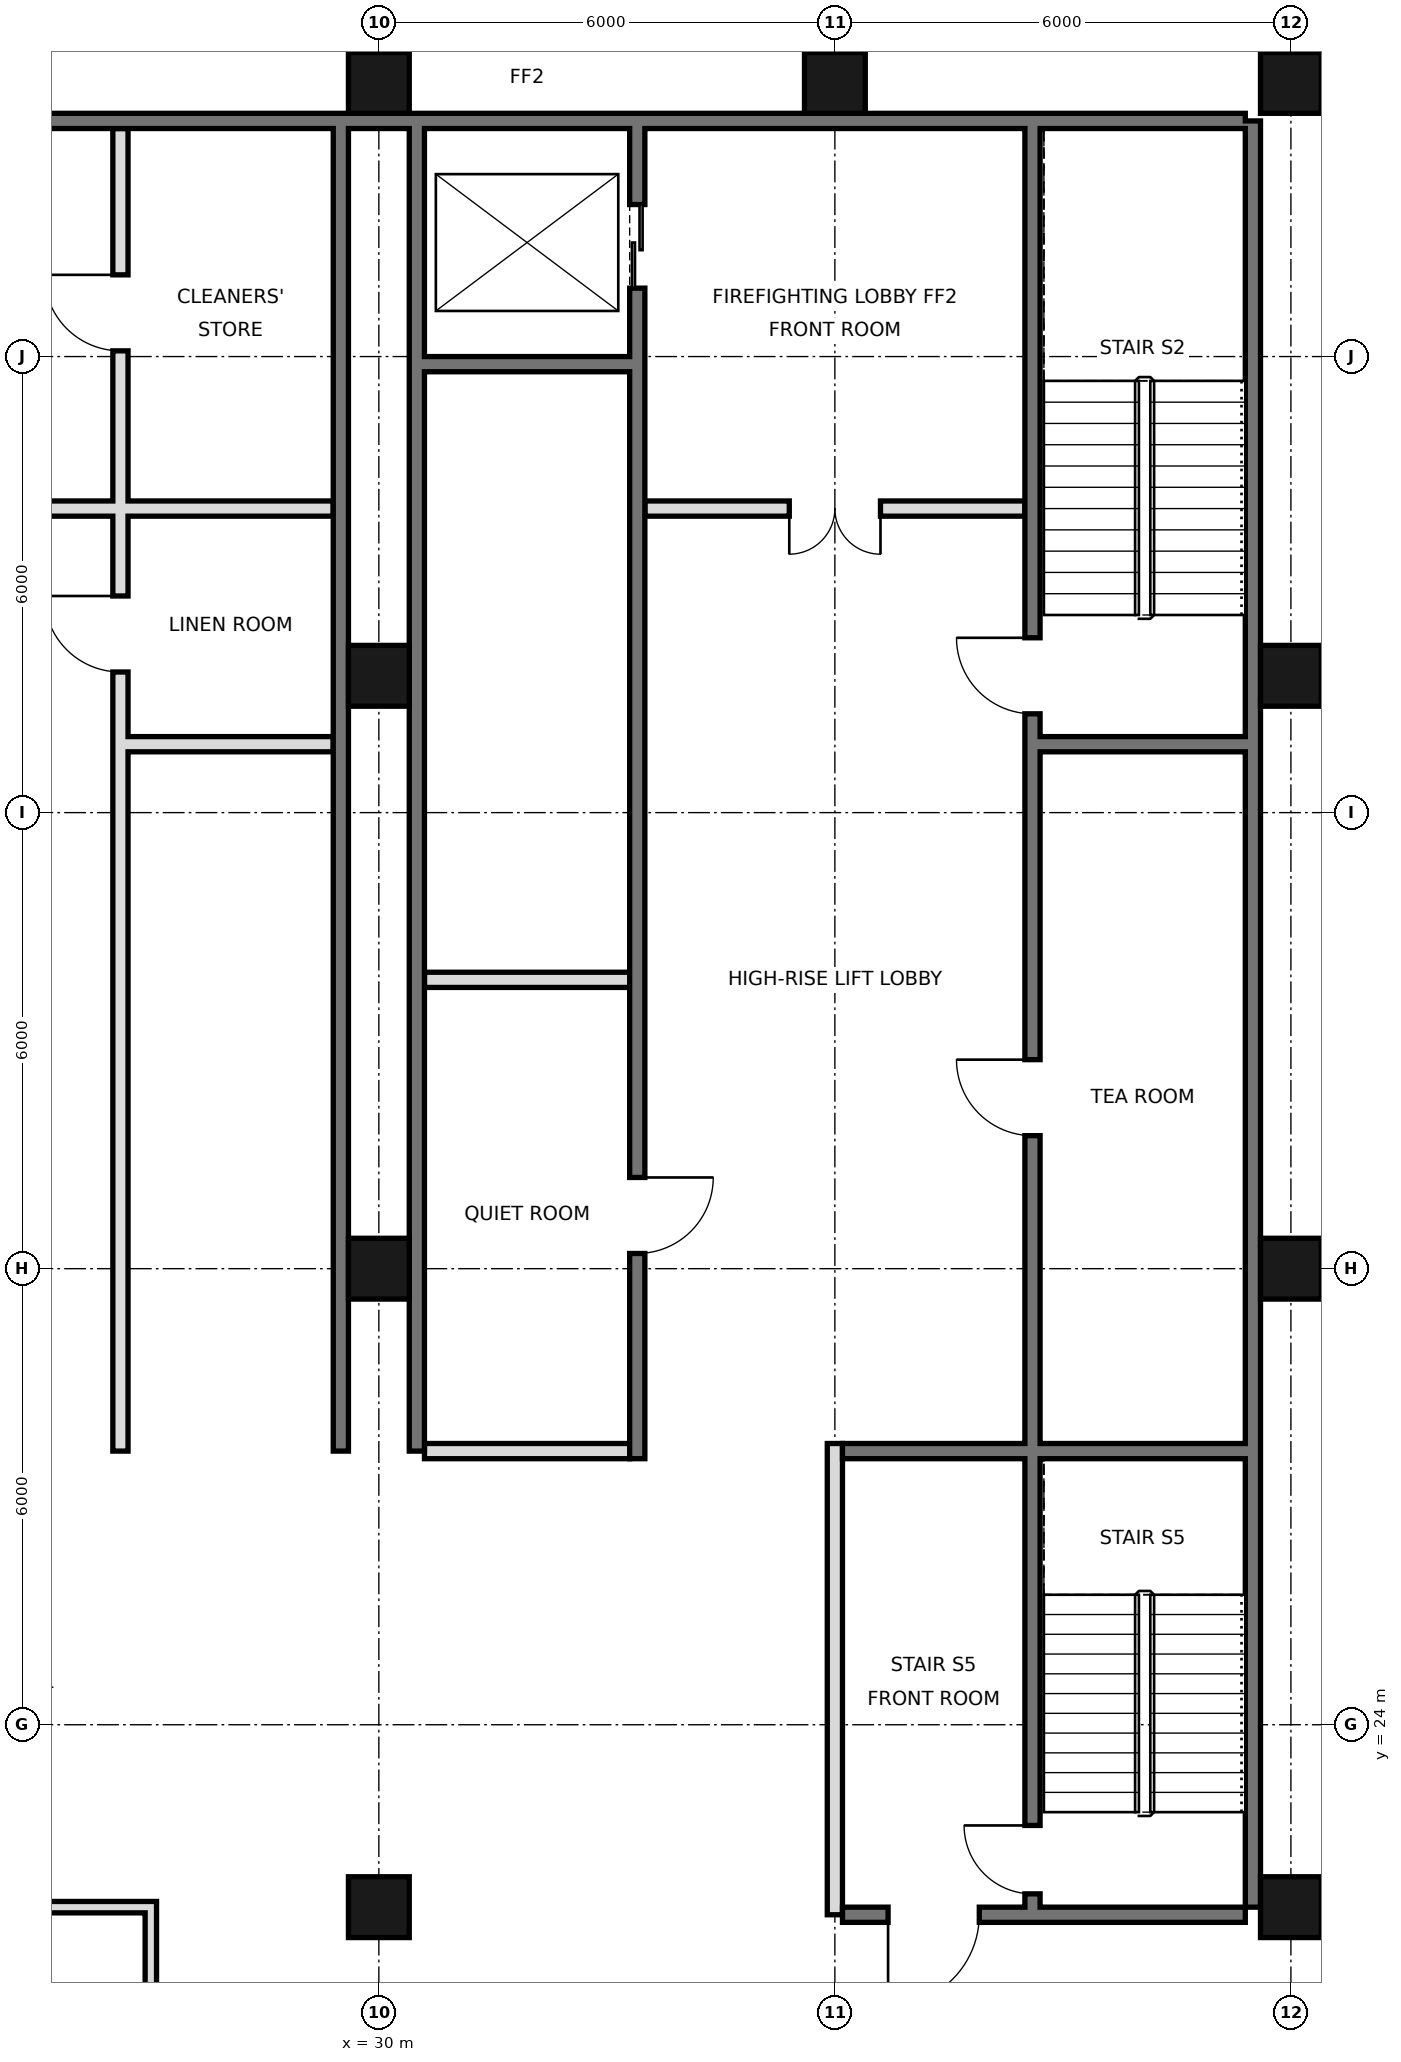
"""IFC4 building model, lengths in metres.
Left out: names, types, materials, properties, quantities, classifications, styles, units other than length and angle.
Written with IfcOpenShell. Run it as: python <this file> out.ifc"""

import sys

from ifc_helpers import new_model, si_unit, direction, frame, frame_2d, origin, origin_2d, place, context, subcontext, project, spatial, rectangle, hollow_rectangle, extrude, element, fill, save


model = new_model("IFC4")
c1 = context("Model", 3, precision=1e-05, world=origin(), true_north=direction((0.0, 1.0)))
c2 = subcontext(c1, "Body", "Model", "MODEL_VIEW")
j1 = project(units=[si_unit("LENGTHUNIT", "METRE"), si_unit("PLANEANGLEUNIT", "RADIAN")], contexts=[c1])
p1 = place(None, origin())
s1 = spatial("IfcSite", under=j1, at=p1, CompositionType="ELEMENT")
p2 = place(p1, origin())
s2 = spatial("IfcBuilding", under=s1, at=p2, CompositionType="ELEMENT")
p3 = place(p2, frame((0.0, 0.0, 341.8)))
s3 = spatial("IfcBuildingStorey", under=s2, at=p3, CompositionType="ELEMENT", Elevation=341.8)
for number, where, z_axis, x_axis in (
    (1, (30.0, 21.6, 0.0), (0.0, 0.0, 1.0), (1.0, 0.0, 0.0)),
    (2, (30.0, 30.0, 0.0), (0.0, 0.0, 1.0), (1.0, 0.0, 0.0)),
    (3, (30.0, 37.8, 0.0), (0.0, 0.0, 1.0), (1.0, 0.0, 0.0)),
    (4, (30.0, 45.6, 0.0), (0.0, 0.0, 1.0), (1.0, 0.0, 0.0)),
    (5, (36.0, 45.6, 0.0), (0.0, 0.0, 1.0), (1.0, 0.0, 0.0)),
    (6, (42.0, 21.6, 0.0), (0.0, 0.0, 1.0), (1.0, 0.0, 0.0)),
    (7, (42.0, 30.0, 0.0), (0.0, 0.0, 1.0), (1.0, 0.0, 0.0)),
    (8, (42.0, 37.8, 0.0), (0.0, 0.0, 1.0), (1.0, 0.0, 0.0)),
    (9, (42.0, 45.6, 0.0), (0.0, 0.0, 1.0), (1.0, 0.0, 0.0)),
):
    element("IfcColumn", number, at=place(p3, frame(where, z_axis=z_axis, x_axis=x_axis)), inside=s3, PredefinedType="COLUMN", context=c2, shape_type="SweptSolid", body=[
        extrude(hollow_rectangle(XDim=0.8, YDim=0.8, WallThickness=0.025, at=origin_2d()), origin(), (0.0, 0.0, 1.0), 4.0),
    ])
p4 = place(p3, frame((27.0, 17.525, 0.0), z_axis=(0.0, 0.0, 1.0), x_axis=(0.0, 1.0, 0.0)))
e10 = element("IfcWall", 10, at=p4, inside=s3, PredefinedType="PARTITIONING", context=c2, shape_type="SweptSolid", body=[
    extrude(rectangle(XDim=4.15, YDim=0.15, at=frame_2d((2.075, 0.0))), origin(), (0.0, 0.0, 1.0), 3.75),
])
p5 = place(p3, frame((23.075, 21.6, 0.0), z_axis=(0.0, 0.0, 1.0), x_axis=(1.0, 0.0, 0.0)))
e11 = element("IfcWall", 11, at=p5, inside=s3, PredefinedType="PARTITIONING", context=c2, shape_type="SweptSolid", body=[
    extrude(rectangle(XDim=3.85, YDim=0.15, at=frame_2d((1.925, 0.0))), origin(), (0.0, 0.0, 1.0), 3.75),
])
p6 = place(p5, frame((1.425, 0.0, 0.0)))
e12 = element("IfcOpeningElement", 12, at=p6, cuts=e11, PredefinedType="OPENING", context=c2, shape_type="SweptSolid", body=[
    extrude(rectangle(XDim=1.0, YDim=2.4, at=frame_2d((0.5, 1.2))), frame((0.0, 0.085, 0.0), z_axis=(0.0, -1.0, 0.0), x_axis=(1.0, 0.0, 0.0)), (0.0, 0.0, 1.0), 0.17),
])
p7 = place(p3, frame((41.5, 21.6, 0.0), z_axis=(0.0, 0.0, 1.0), x_axis=(0.0, 1.0, 0.0)))
e13 = element("IfcWall", 13, at=p7, inside=s3, PredefinedType="SOLIDWALL", context=c2, shape_type="SweptSolid", body=[
    extrude(rectangle(XDim=23.5, YDim=0.2, at=frame_2d((11.75, 0.0))), origin(), (0.0, 0.0, 1.0), 3.75),
])
p8 = place(p3, frame((6.6, 45.1, 0.0), z_axis=(0.0, 0.0, 1.0), x_axis=(1.0, 0.0, 0.0)))
e14 = element("IfcWall", 14, at=p8, inside=s3, PredefinedType="SOLIDWALL", context=c2, shape_type="SweptSolid", body=[
    extrude(rectangle(XDim=34.8, YDim=0.2, at=frame_2d((17.4, 0.0))), origin(), (0.0, 0.0, 1.0), 3.75),
])
for number, where, z_axis, x_axis in (
    (15, (29.5, 27.6, 0.0), (0.0, 0.0, 1.0), (0.0, 1.0, 0.0)),
    (16, (30.5, 27.6, 0.0), (0.0, 0.0, 1.0), (0.0, 1.0, 0.0)),
):
    element("IfcWall", number, at=place(p3, frame(where, z_axis=z_axis, x_axis=x_axis)), inside=s3, PredefinedType="SOLIDWALL", context=c2, shape_type="SweptSolid", body=[
        extrude(rectangle(XDim=17.5, YDim=0.2, at=frame_2d((8.75, 0.0))), origin(), (0.0, 0.0, 1.0), 3.75),
    ])
p9 = place(p3, frame((26.6, 27.6, 0.0), z_axis=(0.0, 0.0, 1.0), x_axis=(0.0, 1.0, 0.0)))
e17 = element("IfcWall", 17, at=p9, inside=s3, PredefinedType="PARTITIONING", context=c2, shape_type="SweptSolid", body=[
    extrude(rectangle(XDim=17.4, YDim=0.2, at=frame_2d((8.7, 0.0))), origin(), (0.0, 0.0, 1.0), 3.75),
])
p10 = place(p9, frame((10.25, 0.0, 0.0)))
e18 = element("IfcOpeningElement", 18, at=p10, cuts=e17, PredefinedType="OPENING", context=c2, shape_type="SweptSolid", body=[
    extrude(rectangle(XDim=1.0, YDim=2.1, at=frame_2d((0.5, 1.05))), frame((0.0, 0.11, 0.0), z_axis=(0.0, -1.0, 0.0), x_axis=(1.0, 0.0, 0.0)), (0.0, 0.0, 1.0), 0.22),
])
p11 = place(p9, frame((14.475, 0.0, 0.0)))
e19 = element("IfcOpeningElement", 19, at=p11, cuts=e17, PredefinedType="OPENING", context=c2, shape_type="SweptSolid", body=[
    extrude(rectangle(XDim=1.0, YDim=2.1, at=frame_2d((0.5, 1.05))), frame((0.0, 0.11, 0.0), z_axis=(0.0, -1.0, 0.0), x_axis=(1.0, 0.0, 0.0)), (0.0, 0.0, 1.0), 0.22),
])
p12 = place(p3, frame((33.4, 27.5, 0.0), z_axis=(0.0, 0.0, 1.0), x_axis=(0.0, 1.0, 0.0)))
e20 = element("IfcWall", 20, at=p12, inside=s3, PredefinedType="SOLIDWALL", context=c2, shape_type="SweptSolid", body=[
    extrude(rectangle(XDim=17.5, YDim=0.2, at=frame_2d((8.75, 0.0))), origin(), (0.0, 0.0, 1.0), 3.75),
])
p13 = place(p12, frame((15.4, 0.0, 0.0)))
e21 = element("IfcOpeningElement", 21, at=p13, cuts=e20, PredefinedType="OPENING", context=c2, shape_type="SweptSolid", body=[
    extrude(rectangle(XDim=1.1, YDim=2.1, at=frame_2d((0.55, 1.05))), frame((0.0, 0.11, 0.0), z_axis=(0.0, -1.0, 0.0), x_axis=(1.0, 0.0, 0.0)), (0.0, 0.0, 1.0), 0.22),
])
p14 = place(p12, frame((2.7, 0.0, 0.0)))
e22 = element("IfcOpeningElement", 22, at=p14, cuts=e20, PredefinedType="OPENING", context=c2, shape_type="SweptSolid", body=[
    extrude(rectangle(XDim=1.0, YDim=2.1, at=frame_2d((0.5, 1.05))), frame((0.0, 0.11, 0.0), z_axis=(0.0, -1.0, 0.0), x_axis=(1.0, 0.0, 0.0)), (0.0, 0.0, 1.0), 0.22),
])
p15 = place(p3, frame((36.0, 21.5, 0.0), z_axis=(0.0, 0.0, 1.0), x_axis=(0.0, 1.0, 0.0)))
e23 = element("IfcWall", 23, at=p15, inside=s3, PredefinedType="PARTITIONING", context=c2, shape_type="SweptSolid", body=[
    extrude(rectangle(XDim=6.2, YDim=0.2, at=frame_2d((3.1, 0.0))), origin(), (0.0, 0.0, 1.0), 3.75),
])
p16 = place(p3, frame((38.6, 21.5, 0.0), z_axis=(0.0, 0.0, 1.0), x_axis=(0.0, 1.0, 0.0)))
e24 = element("IfcWall", 24, at=p16, inside=s3, PredefinedType="SOLIDWALL", context=c2, shape_type="SweptSolid", body=[
    extrude(rectangle(XDim=23.5, YDim=0.2, at=frame_2d((11.75, 0.0))), origin(), (0.0, 0.0, 1.0), 3.75),
])
p17 = place(p16, frame((10.25, 0.0, 0.0)))
e25 = element("IfcOpeningElement", 25, at=p17, cuts=e24, PredefinedType="OPENING", context=c2, shape_type="SweptSolid", body=[
    extrude(rectangle(XDim=1.0, YDim=2.1, at=frame_2d((0.5, 1.05))), frame((0.0, 0.11, 0.0), z_axis=(0.0, -1.0, 0.0), x_axis=(1.0, 0.0, 0.0)), (0.0, 0.0, 1.0), 0.22),
])
p18 = place(p16, frame((15.8, 0.0, 0.0)))
e26 = element("IfcOpeningElement", 26, at=p18, cuts=e24, PredefinedType="OPENING", context=c2, shape_type="SweptSolid", body=[
    extrude(rectangle(XDim=1.0, YDim=2.1, at=frame_2d((0.5, 1.05))), frame((0.0, 0.11, 0.0), z_axis=(0.0, -1.0, 0.0), x_axis=(1.0, 0.0, 0.0)), (0.0, 0.0, 1.0), 0.22),
])
p19 = place(p16, frame((0.275, 0.0, 0.0)))
e27 = element("IfcOpeningElement", 27, at=p19, cuts=e24, PredefinedType="OPENING", context=c2, shape_type="SweptSolid", body=[
    extrude(rectangle(XDim=0.9, YDim=2.1, at=frame_2d((0.45, 1.05))), frame((0.0, 0.11, 0.0), z_axis=(0.0, -1.0, 0.0), x_axis=(1.0, 0.0, 0.0)), (0.0, 0.0, 1.0), 0.22),
])
p20 = place(p3, frame((36.1, 21.5, 0.0), z_axis=(0.0, 0.0, 1.0), x_axis=(1.0, 0.0, 0.0)))
e28 = element("IfcWall", 28, at=p20, inside=s3, PredefinedType="SOLIDWALL", context=c2, shape_type="SweptSolid", body=[
    extrude(rectangle(XDim=5.3, YDim=0.2, at=frame_2d((2.65, 0.0))), origin(), (0.0, 0.0, 1.0), 3.75),
])
p21 = place(p20, frame((0.6, 0.0, 0.0)))
e29 = element("IfcOpeningElement", 29, at=p21, cuts=e28, PredefinedType="OPENING", context=c2, shape_type="SweptSolid", body=[
    extrude(rectangle(XDim=1.2, YDim=2.1, at=frame_2d((0.6, 1.05))), frame((0.0, 0.11, 0.0), z_axis=(0.0, -1.0, 0.0), x_axis=(1.0, 0.0, 0.0)), (0.0, 0.0, 1.0), 0.22),
])
p22 = place(p3, frame((30.6, 27.6, 0.0), z_axis=(0.0, 0.0, 1.0), x_axis=(1.0, 0.0, 0.0)))
e30 = element("IfcWall", 30, at=p22, inside=s3, PredefinedType="PARTITIONING", context=c2, shape_type="SweptSolid", body=[
    extrude(rectangle(XDim=2.7, YDim=0.2, at=frame_2d((1.35, 0.0))), origin(), (0.0, 0.0, 1.0), 3.75),
])
p23 = place(p3, frame((36.1, 27.6, 0.0), z_axis=(0.0, 0.0, 1.0), x_axis=(1.0, 0.0, 0.0)))
e31 = element("IfcWall", 31, at=p23, inside=s3, PredefinedType="SOLIDWALL", context=c2, shape_type="SweptSolid", body=[
    extrude(rectangle(XDim=5.3, YDim=0.2, at=frame_2d((2.65, 0.0))), origin(), (0.0, 0.0, 1.0), 3.75),
])
for number, where, z_axis, x_axis in (
    (32, (30.6, 33.8, 0.0), (0.0, 0.0, 1.0), (1.0, 0.0, 0.0)),
    (33, (26.7, 36.9, 0.0), (0.0, 0.0, 1.0), (1.0, 0.0, 0.0)),
):
    element("IfcWall", number, at=place(p3, frame(where, z_axis=z_axis, x_axis=x_axis)), inside=s3, PredefinedType="PARTITIONING", context=c2, shape_type="SweptSolid", body=[
        extrude(rectangle(XDim=2.7, YDim=0.2, at=frame_2d((1.35, 0.0))), origin(), (0.0, 0.0, 1.0), 3.75),
    ])
p24 = place(p3, frame((38.7, 36.9, 0.0), z_axis=(0.0, 0.0, 1.0), x_axis=(1.0, 0.0, 0.0)))
e34 = element("IfcWall", 34, at=p24, inside=s3, PredefinedType="SOLIDWALL", context=c2, shape_type="SweptSolid", body=[
    extrude(rectangle(XDim=2.7, YDim=0.2, at=frame_2d((1.35, 0.0))), origin(), (0.0, 0.0, 1.0), 3.75),
])
p25 = place(p3, frame((21.5, 40.0, 0.0), z_axis=(0.0, 0.0, 1.0), x_axis=(1.0, 0.0, 0.0)))
e35 = element("IfcWall", 35, at=p25, inside=s3, PredefinedType="PARTITIONING", context=c2, shape_type="SweptSolid", body=[
    extrude(rectangle(XDim=7.9, YDim=0.2, at=frame_2d((3.95, 0.0))), origin(), (0.0, 0.0, 1.0), 3.75),
])
p26 = place(p25, frame((1.9, 0.0, 0.0)))
e36 = element("IfcOpeningElement", 36, at=p26, cuts=e35, PredefinedType="OPENING", context=c2, shape_type="SweptSolid", body=[
    extrude(rectangle(XDim=1.2, YDim=2.1, at=frame_2d((0.6, 1.05))), frame((0.0, 0.11, 0.0), z_axis=(0.0, -1.0, 0.0), x_axis=(1.0, 0.0, 0.0)), (0.0, 0.0, 1.0), 0.22),
])
p27 = place(p3, frame((33.5, 40.0, 0.0), z_axis=(0.0, 0.0, 1.0), x_axis=(1.0, 0.0, 0.0)))
e37 = element("IfcWall", 37, at=p27, inside=s3, PredefinedType="PARTITIONING", context=c2, shape_type="SweptSolid", body=[
    extrude(rectangle(XDim=5.0, YDim=0.2, at=frame_2d((2.5, 0.0))), origin(), (0.0, 0.0, 1.0), 3.75),
])
p28 = place(p27, frame((1.9, 0.0, 0.0)))
e38 = element("IfcOpeningElement", 38, at=p28, cuts=e37, PredefinedType="OPENING", context=c2, shape_type="SweptSolid", body=[
    extrude(rectangle(XDim=1.2, YDim=2.1, at=frame_2d((0.6, 1.05))), frame((0.0, 0.11, 0.0), z_axis=(0.0, -1.0, 0.0), x_axis=(1.0, 0.0, 0.0)), (0.0, 0.0, 1.0), 0.22),
])
p29 = place(p3, frame((30.6, 41.9, 0.0), z_axis=(0.0, 0.0, 1.0), x_axis=(1.0, 0.0, 0.0)))
e39 = element("IfcWall", 39, at=p29, inside=s3, PredefinedType="SOLIDWALL", context=c2, shape_type="SweptSolid", body=[
    extrude(rectangle(XDim=2.7, YDim=0.2, at=frame_2d((1.35, 0.0))), origin(), (0.0, 0.0, 1.0), 3.75),
])
p30 = place(p21, frame((1.2, 0.0, 0.0), z_axis=(0.0, 0.0, 1.0), x_axis=(-1.0, 0.0, 0.0)))
e40 = element("IfcDoor", 40, at=p30, inside=s3, OperationType="SINGLE_SWING_RIGHT", PredefinedType="DOOR", context=c2, shape_type="SweptSolid", body=[
    extrude(rectangle(XDim=1.2, YDim=2.1, at=frame_2d((0.6, 1.05))), frame((0.0, 0.025, 0.0), z_axis=(0.0, -1.0, 0.0), x_axis=(1.0, 0.0, 0.0)), (0.0, 0.0, 1.0), 0.05),
])
fill(e29, e40)
p31 = place(p28, frame((1.2, 0.0, 0.0), z_axis=(0.0, 0.0, 1.0), x_axis=(-1.0, 0.0, 0.0)))
e41 = element("IfcDoor", 41, at=p31, inside=s3, OperationType="DOUBLE_DOOR_SINGLE_SWING", PredefinedType="DOOR", context=c2, shape_type="SweptSolid", body=[
    extrude(rectangle(XDim=1.2, YDim=2.1, at=frame_2d((0.6, 1.05))), frame((0.0, 0.025, 0.0), z_axis=(0.0, -1.0, 0.0), x_axis=(1.0, 0.0, 0.0)), (0.0, 0.0, 1.0), 0.05),
])
fill(e38, e41)
p32 = place(p13, origin())
e42 = element("IfcDoor", 42, at=p32, inside=s3, OperationType="DOUBLE_DOOR_SLIDING", PredefinedType="DOOR", context=c2, shape_type="SweptSolid", body=[
    extrude(rectangle(XDim=1.1, YDim=2.1, at=frame_2d((0.55, 1.05))), frame((0.0, 0.025, 0.0), z_axis=(0.0, -1.0, 0.0), x_axis=(1.0, 0.0, 0.0)), (0.0, 0.0, 1.0), 0.05),
])
fill(e21, e42)
p33 = place(p17, frame((1.0, 0.0, 0.0), z_axis=(0.0, 0.0, 1.0), x_axis=(-1.0, 0.0, 0.0)))
e43 = element("IfcDoor", 43, at=p33, inside=s3, OperationType="SINGLE_SWING_LEFT", PredefinedType="DOOR", context=c2, shape_type="SweptSolid", body=[
    extrude(rectangle(XDim=1.0, YDim=2.1, at=frame_2d((0.5, 1.05))), frame((0.0, 0.025, 0.0), z_axis=(0.0, -1.0, 0.0), x_axis=(1.0, 0.0, 0.0)), (0.0, 0.0, 1.0), 0.05),
])
fill(e25, e43)
p34 = place(p14, origin())
e44 = element("IfcDoor", 44, at=p34, inside=s3, OperationType="SINGLE_SWING_RIGHT", PredefinedType="DOOR", context=c2, shape_type="SweptSolid", body=[
    extrude(rectangle(XDim=1.0, YDim=2.1, at=frame_2d((0.5, 1.05))), frame((0.0, 0.025, 0.0), z_axis=(0.0, -1.0, 0.0), x_axis=(1.0, 0.0, 0.0)), (0.0, 0.0, 1.0), 0.05),
])
fill(e22, e44)
p35 = place(p18, frame((1.0, 0.0, 0.0), z_axis=(0.0, 0.0, 1.0), x_axis=(-1.0, 0.0, 0.0)))
e45 = element("IfcDoor", 45, at=p35, inside=s3, OperationType="SINGLE_SWING_LEFT", PredefinedType="DOOR", context=c2, shape_type="SweptSolid", body=[
    extrude(rectangle(XDim=1.0, YDim=2.1, at=frame_2d((0.5, 1.05))), frame((0.0, 0.025, 0.0), z_axis=(0.0, -1.0, 0.0), x_axis=(1.0, 0.0, 0.0)), (0.0, 0.0, 1.0), 0.05),
])
fill(e26, e45)
p36 = place(p19, frame((0.9, 0.0, 0.0), z_axis=(0.0, 0.0, 1.0), x_axis=(-1.0, 0.0, 0.0)))
e46 = element("IfcDoor", 46, at=p36, inside=s3, OperationType="SINGLE_SWING_LEFT", PredefinedType="DOOR", context=c2, shape_type="SweptSolid", body=[
    extrude(rectangle(XDim=0.9, YDim=2.1, at=frame_2d((0.45, 1.05))), frame((0.0, 0.025, 0.0), z_axis=(0.0, -1.0, 0.0), x_axis=(1.0, 0.0, 0.0)), (0.0, 0.0, 1.0), 0.05),
])
fill(e27, e46)
p37 = place(p10, frame((1.0, 0.0, 0.0), z_axis=(0.0, 0.0, 1.0), x_axis=(-1.0, 0.0, 0.0)))
e47 = element("IfcDoor", 47, at=p37, inside=s3, OperationType="SINGLE_SWING_LEFT", PredefinedType="DOOR", context=c2, shape_type="SweptSolid", body=[
    extrude(rectangle(XDim=1.0, YDim=2.1, at=frame_2d((0.5, 1.05))), frame((0.0, 0.025, 0.0), z_axis=(0.0, -1.0, 0.0), x_axis=(1.0, 0.0, 0.0)), (0.0, 0.0, 1.0), 0.05),
])
fill(e18, e47)
p38 = place(p11, frame((1.0, 0.0, 0.0), z_axis=(0.0, 0.0, 1.0), x_axis=(-1.0, 0.0, 0.0)))
e48 = element("IfcDoor", 48, at=p38, inside=s3, OperationType="SINGLE_SWING_LEFT", PredefinedType="DOOR", context=c2, shape_type="SweptSolid", body=[
    extrude(rectangle(XDim=1.0, YDim=2.1, at=frame_2d((0.5, 1.05))), frame((0.0, 0.025, 0.0), z_axis=(0.0, -1.0, 0.0), x_axis=(1.0, 0.0, 0.0)), (0.0, 0.0, 1.0), 0.05),
])
fill(e19, e48)
save(model, sys.argv[1])
